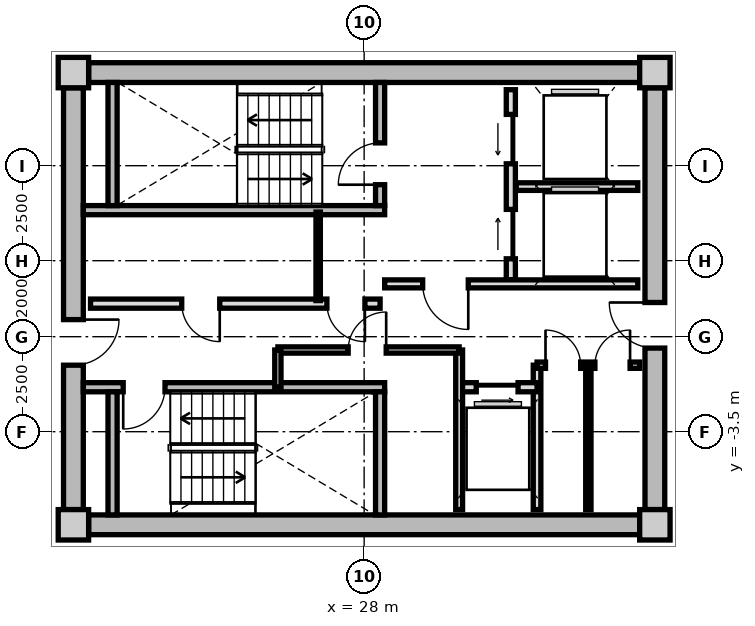
"""IFC4 building model, lengths in metres.
Left out: names, types, materials, properties, quantities, classifications, styles, units other than length and angle.
Written with IfcOpenShell. Run it as: python <this file> out.ifc"""

import sys

from ifc_helpers import new_model, si_unit, direction, frame, frame_2d, origin, origin_2d, place, context, subcontext, project, spatial, rectangle, extrude, source, transform, mapped, element, fill, save


model = new_model("IFC4")
c1 = context("Model", 3, precision=1e-05, world=origin(), true_north=direction((0.0, 1.0)))
c2 = subcontext(c1, "Body", "Model", "MODEL_VIEW")
j1 = project(units=[si_unit("LENGTHUNIT", "METRE"), si_unit("PLANEANGLEUNIT", "RADIAN")], contexts=[c1])
p1 = place(None, origin())
s1 = spatial("IfcSite", under=j1, at=p1, CompositionType="ELEMENT")
p2 = place(p1, origin())
s2 = spatial("IfcBuilding", under=s1, at=p2, CompositionType="ELEMENT")
p3 = place(p2, frame((0.0, 0.0, 238.3)))
s3 = spatial("IfcBuildingStorey", under=s2, at=p3, CompositionType="ELEMENT", Elevation=238.3)
m1 = source(origin(), c2, "Body", "SweptSolid", [
    extrude(rectangle(XDim=0.8, YDim=0.8, at=origin_2d()), origin(), (0.0, 0.0, 1.0), 3.05),
])
for number, where, z_axis, x_axis in (
    (1, (20.35, -5.95, 0.0), (0.0, 0.0, 1.0), (1.0, 0.0, 0.0)),
    (2, (35.65, -5.95, 0.0), (0.0, 0.0, 1.0), (1.0, 0.0, 0.0)),
    (3, (35.65, 5.95, 0.0), (0.0, 0.0, 1.0), (1.0, 0.0, 0.0)),
    (4, (20.35, 5.95, 0.0), (0.0, 0.0, 1.0), (1.0, 0.0, 0.0)),
):
    element("IfcColumn", number, at=place(p3, frame(where, z_axis=z_axis, x_axis=x_axis)), inside=s3, PredefinedType="COLUMN", context=c2, shape_type="MappedRepresentation", body=[
        mapped(m1, transform((0.0, 0.0, 0.0), x_axis=(1.0, 0.0, 0.0), y_axis=(0.0, 1.0, 0.0), z_axis=(0.0, 0.0, 1.0), scale=1.0)),
    ])
m2 = source(origin(), c2, "Body", "SweptSolid", [
    extrude(rectangle(XDim=14.5, YDim=0.52, at=frame_2d((7.25, 0.0))), origin(), (0.0, 0.0, 1.0), 2.81),
])
for number, where, z_axis, x_axis in (
    (5, (20.75, 5.95, 0.0), (0.0, 0.0, 1.0), (1.0, 0.0, 0.0)),
    (6, (35.25, -5.95, 0.0), (0.0, 0.0, 1.0), (-1.0, 0.0, 0.0)),
):
    element("IfcWall", number, at=place(p3, frame(where, z_axis=z_axis, x_axis=x_axis)), inside=s3, PredefinedType="SHEAR", context=c2, shape_type="MappedRepresentation", body=[
        mapped(m2, transform((0.0, 0.0, 0.0), x_axis=(1.0, 0.0, 0.0), y_axis=(0.0, 1.0, 0.0), z_axis=(0.0, 0.0, 1.0), scale=1.0)),
    ])
m3 = source(origin(), c2, "Body", "SweptSolid", [
    extrude(rectangle(XDim=11.1, YDim=0.52, at=frame_2d((5.55, 0.0))), origin(), (0.0, 0.0, 1.0), 2.81),
])
p4 = place(p3, frame((20.35, -5.55, 0.0), z_axis=(0.0, 0.0, 1.0), x_axis=(0.0, 1.0, 0.0)))
e7 = element("IfcWall", 7, at=p4, inside=s3, PredefinedType="SHEAR", context=c2, shape_type="MappedRepresentation", body=[
    mapped(m3, transform((0.0, 0.0, 0.0), x_axis=(1.0, 0.0, 0.0), y_axis=(0.0, 1.0, 0.0), z_axis=(0.0, 0.0, 1.0), scale=1.0)),
])
p5 = place(p4, frame((3.8, 0.0, 0.0)))
e8 = element("IfcOpeningElement", 8, at=p5, cuts=e7, PredefinedType="OPENING", context=c2, shape_type="SweptSolid", body=[
    extrude(rectangle(XDim=1.2, YDim=2.15, at=frame_2d((0.6, 1.075))), frame((0.0, 0.27, 0.0), z_axis=(0.0, -1.0, 0.0), x_axis=(1.0, 0.0, 0.0)), (0.0, 0.0, 1.0), 0.54),
])
p6 = place(p3, frame((35.65, 5.55, 0.0), z_axis=(0.0, 0.0, 1.0), x_axis=(0.0, -1.0, 0.0)))
e9 = element("IfcWall", 9, at=p6, inside=s3, PredefinedType="SHEAR", context=c2, shape_type="MappedRepresentation", body=[
    mapped(m3, transform((0.0, 0.0, 0.0), x_axis=(1.0, 0.0, 0.0), y_axis=(0.0, 1.0, 0.0), z_axis=(0.0, 0.0, 1.0), scale=1.0)),
])
p7 = place(p6, frame((5.65, 0.0, 0.0)))
e10 = element("IfcOpeningElement", 10, at=p7, cuts=e9, PredefinedType="OPENING", context=c2, shape_type="SweptSolid", body=[
    extrude(rectangle(XDim=1.2, YDim=2.15, at=frame_2d((0.6, 1.075))), frame((0.0, 0.27, 0.0), z_axis=(0.0, -1.0, 0.0), x_axis=(1.0, 0.0, 0.0)), (0.0, 0.0, 1.0), 0.54),
])
m4 = source(origin(), c2, "Body", "SweptSolid", [
    extrude(rectangle(XDim=7.93, YDim=0.24, at=frame_2d((3.965, 0.0))), origin(), (0.0, 0.0, 1.0), 2.81),
])
p8 = place(p3, frame((20.61, 2.33, 0.0), z_axis=(0.0, 0.0, 1.0), x_axis=(1.0, 0.0, 0.0)))
e11 = element("IfcWall", 11, at=p8, inside=s3, PredefinedType="PARTITIONING", context=c2, shape_type="MappedRepresentation", body=[
    mapped(m4, transform((0.0, 0.0, 0.0), x_axis=(1.0, 0.0, 0.0), y_axis=(0.0, 1.0, 0.0), z_axis=(0.0, 0.0, 1.0), scale=1.0)),
])
m5 = source(origin(), c2, "Body", "SweptSolid", [
    extrude(rectangle(XDim=3.24, YDim=0.24, at=frame_2d((1.62, 0.0))), origin(), (0.0, 0.0, 1.0), 2.81),
])
p9 = place(p3, frame((21.38, 2.45, 0.0), z_axis=(0.0, 0.0, 1.0), x_axis=(0.0, 1.0, 0.0)))
e12 = element("IfcWall", 12, at=p9, inside=s3, PredefinedType="PARTITIONING", context=c2, shape_type="MappedRepresentation", body=[
    mapped(m5, transform((0.0, 0.0, 0.0), x_axis=(1.0, 0.0, 0.0), y_axis=(0.0, 1.0, 0.0), z_axis=(0.0, 0.0, 1.0), scale=1.0)),
])
p10 = place(p3, frame((28.42, 2.45, 0.0), z_axis=(0.0, 0.0, 1.0), x_axis=(0.0, 1.0, 0.0)))
e13 = element("IfcWall", 13, at=p10, inside=s3, PredefinedType="PARTITIONING", context=c2, shape_type="MappedRepresentation", body=[
    mapped(m5, transform((0.0, 0.0, 0.0), x_axis=(1.0, 0.0, 0.0), y_axis=(0.0, 1.0, 0.0), z_axis=(0.0, 0.0, 1.0), scale=1.0)),
])
p11 = place(p10, frame((0.55, 0.0, 0.0)))
e14 = element("IfcOpeningElement", 14, at=p11, cuts=e13, PredefinedType="OPENING", context=c2, shape_type="SweptSolid", body=[
    extrude(rectangle(XDim=1.1, YDim=2.15, at=frame_2d((0.55, 1.075))), frame((0.0, 0.13, 0.0), z_axis=(0.0, -1.0, 0.0), x_axis=(1.0, 0.0, 0.0)), (0.0, 0.0, 1.0), 0.26),
])
p12 = place(p3, frame((20.61, -2.33, 0.0), z_axis=(0.0, 0.0, 1.0), x_axis=(1.0, 0.0, 0.0)))
e15 = element("IfcWall", 15, at=p12, inside=s3, PredefinedType="PARTITIONING", context=c2, shape_type="MappedRepresentation", body=[
    mapped(m4, transform((0.0, 0.0, 0.0), x_axis=(1.0, 0.0, 0.0), y_axis=(0.0, 1.0, 0.0), z_axis=(0.0, 0.0, 1.0), scale=1.0)),
])
p13 = place(p12, frame((1.05, 0.0, 0.0)))
e16 = element("IfcOpeningElement", 16, at=p13, cuts=e15, PredefinedType="OPENING", context=c2, shape_type="SweptSolid", body=[
    extrude(rectangle(XDim=1.1, YDim=2.15, at=frame_2d((0.55, 1.075))), frame((0.0, 0.13, 0.0), z_axis=(0.0, -1.0, 0.0), x_axis=(1.0, 0.0, 0.0)), (0.0, 0.0, 1.0), 0.26),
])
for number, where, z_axis, x_axis in (
    (17, (21.38, -5.69, 0.0), (0.0, 0.0, 1.0), (0.0, 1.0, 0.0)),
    (18, (28.42, -5.69, 0.0), (0.0, 0.0, 1.0), (0.0, 1.0, 0.0)),
):
    element("IfcWall", number, at=place(p3, frame(where, z_axis=z_axis, x_axis=x_axis)), inside=s3, PredefinedType="PARTITIONING", context=c2, shape_type="MappedRepresentation", body=[
        mapped(m5, transform((0.0, 0.0, 0.0), x_axis=(1.0, 0.0, 0.0), y_axis=(0.0, 1.0, 0.0), z_axis=(0.0, 0.0, 1.0), scale=1.0)),
    ])
m6 = source(origin(), c2, "Body", "SweptSolid", [
    extrude(rectangle(XDim=5.0, YDim=0.24, at=frame_2d((2.5, 0.0))), origin(), (0.0, 0.0, 1.0), 2.795),
])
p14 = place(p3, frame((31.86, 0.5, 0.0), z_axis=(0.0, 0.0, 1.0), x_axis=(0.0, 1.0, 0.0)))
e19 = element("IfcWall", 19, at=p14, inside=s3, PredefinedType="PARTITIONING", context=c2, shape_type="MappedRepresentation", body=[
    mapped(m6, transform((0.0, 0.0, 0.0), x_axis=(1.0, 0.0, 0.0), y_axis=(0.0, 1.0, 0.0), z_axis=(0.0, 0.0, 1.0), scale=1.0)),
])
p15 = place(p14, frame((3.05, 0.0, 0.0)))
e20 = element("IfcOpeningElement", 20, at=p15, cuts=e19, PredefinedType="OPENING", context=c2, shape_type="SweptSolid", body=[
    extrude(rectangle(XDim=1.3, YDim=2.2, at=frame_2d((0.65, 1.1))), frame((0.0, 0.13, 0.0), z_axis=(0.0, -1.0, 0.0), x_axis=(1.0, 0.0, 0.0)), (0.0, 0.0, 1.0), 0.26),
])
p16 = place(p14, frame((0.55, 0.0, 0.0)))
e21 = element("IfcOpeningElement", 21, at=p16, cuts=e19, PredefinedType="OPENING", context=c2, shape_type="SweptSolid", body=[
    extrude(rectangle(XDim=1.3, YDim=2.2, at=frame_2d((0.65, 1.1))), frame((0.0, 0.13, 0.0), z_axis=(0.0, -1.0, 0.0), x_axis=(1.0, 0.0, 0.0)), (0.0, 0.0, 1.0), 0.26),
])
m7 = source(origin(), c2, "Body", "SweptSolid", [
    extrude(rectangle(XDim=3.2, YDim=0.2, at=frame_2d((1.6, 0.0))), origin(), (0.0, 0.0, 1.0), 2.795),
])
p17 = place(p3, frame((32.0, 2.95, 0.0), z_axis=(0.0, 0.0, 1.0), x_axis=(1.0, 0.0, 0.0)))
e22 = element("IfcWall", 22, at=p17, inside=s3, PredefinedType="PARTITIONING", context=c2, shape_type="MappedRepresentation", body=[
    mapped(m7, transform((0.0, 0.0, 0.0), x_axis=(1.0, 0.0, 0.0), y_axis=(0.0, 1.0, 0.0), z_axis=(0.0, 0.0, 1.0), scale=1.0)),
])
m8 = source(origin(), c2, "Body", "SweptSolid", [
    extrude(rectangle(XDim=6.66, YDim=0.21, at=frame_2d((3.33, 0.0))), origin(), (0.0, 0.0, 1.0), 2.795),
])
p18 = place(p3, frame((28.54, 0.39, 0.0), z_axis=(0.0, 0.0, 1.0), x_axis=(1.0, 0.0, 0.0)))
e23 = element("IfcWall", 23, at=p18, inside=s3, PredefinedType="PARTITIONING", context=c2, shape_type="MappedRepresentation", body=[
    mapped(m8, transform((0.0, 0.0, 0.0), x_axis=(1.0, 0.0, 0.0), y_axis=(0.0, 1.0, 0.0), z_axis=(0.0, 0.0, 1.0), scale=1.0)),
])
p19 = place(p18, frame((1.0, 0.0, 0.0)))
e24 = element("IfcOpeningElement", 24, at=p19, cuts=e23, PredefinedType="OPENING", context=c2, shape_type="SweptSolid", body=[
    extrude(rectangle(XDim=1.2, YDim=2.15, at=frame_2d((0.6, 1.075))), frame((0.0, 0.115, 0.0), z_axis=(0.0, -1.0, 0.0), x_axis=(1.0, 0.0, 0.0)), (0.0, 0.0, 1.0), 0.23),
])
m9 = source(origin(), c2, "Body", "SweptSolid", [
    extrude(rectangle(XDim=7.62, YDim=0.24, at=frame_2d((3.81, 0.0))), origin(), (0.0, 0.0, 1.0), 2.795),
])
p20 = place(p3, frame((20.8, -0.13, 0.0), z_axis=(0.0, 0.0, 1.0), x_axis=(1.0, 0.0, 0.0)))
e25 = element("IfcWall", 25, at=p20, inside=s3, PredefinedType="PARTITIONING", context=c2, shape_type="MappedRepresentation", body=[
    mapped(m9, transform((0.0, 0.0, 0.0), x_axis=(1.0, 0.0, 0.0), y_axis=(0.0, 1.0, 0.0), z_axis=(0.0, 0.0, 1.0), scale=1.0)),
])
p21 = place(p20, frame((6.22, 0.0, 0.0)))
e26 = element("IfcOpeningElement", 26, at=p21, cuts=e25, PredefinedType="OPENING", context=c2, shape_type="SweptSolid", body=[
    extrude(rectangle(XDim=1.0, YDim=2.1, at=frame_2d((0.5, 1.05))), frame((0.0, 0.13, 0.0), z_axis=(0.0, -1.0, 0.0), x_axis=(1.0, 0.0, 0.0)), (0.0, 0.0, 1.0), 0.26),
])
p22 = place(p20, frame((2.4, 0.0, 0.0)))
e27 = element("IfcOpeningElement", 27, at=p22, cuts=e25, PredefinedType="OPENING", context=c2, shape_type="SweptSolid", body=[
    extrude(rectangle(XDim=1.0, YDim=2.1, at=frame_2d((0.5, 1.05))), frame((0.0, 0.13, 0.0), z_axis=(0.0, -1.0, 0.0), x_axis=(1.0, 0.0, 0.0)), (0.0, 0.0, 1.0), 0.26),
])
m10 = source(origin(), c2, "Body", "SweptSolid", [
    extrude(rectangle(XDim=2.33, YDim=0.115, at=frame_2d((1.165, 0.0))), origin(), (0.0, 0.0, 1.0), 2.795),
])
p23 = place(p3, frame((26.79, -0.05, 0.0), z_axis=(0.0, 0.0, 1.0), x_axis=(0.0, 1.0, 0.0)))
e28 = element("IfcWall", 28, at=p23, inside=s3, PredefinedType="PARTITIONING", context=c2, shape_type="MappedRepresentation", body=[
    mapped(m10, transform((0.0, 0.0, 0.0), x_axis=(1.0, 0.0, 0.0), y_axis=(0.0, 1.0, 0.0), z_axis=(0.0, 0.0, 1.0), scale=1.0)),
])
m11 = source(origin(), c2, "Body", "SweptSolid", [
    extrude(rectangle(XDim=3.8, YDim=0.2, at=frame_2d((1.9, 0.0))), origin(), (0.0, 0.0, 1.0), 2.795),
])
p24 = place(p3, frame((32.55, -5.55, 0.0), z_axis=(0.0, 0.0, 1.0), x_axis=(0.0, 1.0, 0.0)))
e29 = element("IfcWall", 29, at=p24, inside=s3, PredefinedType="PARTITIONING", context=c2, shape_type="MappedRepresentation", body=[
    mapped(m11, transform((0.0, 0.0, 0.0), x_axis=(1.0, 0.0, 0.0), y_axis=(0.0, 1.0, 0.0), z_axis=(0.0, 0.0, 1.0), scale=1.0)),
])
m12 = source(origin(), c2, "Body", "SweptSolid", [
    extrude(rectangle(XDim=2.05, YDim=0.24, at=frame_2d((1.025, 0.0))), origin(), (0.0, 0.0, 1.0), 2.795),
])
p25 = place(p3, frame((30.5, -2.33, 0.0), z_axis=(0.0, 0.0, 1.0), x_axis=(1.0, 0.0, 0.0)))
e30 = element("IfcWall", 30, at=p25, inside=s3, PredefinedType="PARTITIONING", context=c2, shape_type="MappedRepresentation", body=[
    mapped(m12, transform((0.0, 0.0, 0.0), x_axis=(1.0, 0.0, 0.0), y_axis=(0.0, 1.0, 0.0), z_axis=(0.0, 0.0, 1.0), scale=1.0)),
])
p26 = place(p25, frame((0.45, 0.0, 0.0)))
e31 = element("IfcOpeningElement", 31, at=p26, cuts=e30, PredefinedType="OPENING", context=c2, shape_type="SweptSolid", body=[
    extrude(rectangle(XDim=1.1, YDim=2.2, at=frame_2d((0.55, 1.1))), frame((0.0, 0.13, 0.0), z_axis=(0.0, -1.0, 0.0), x_axis=(1.0, 0.0, 0.0)), (0.0, 0.0, 1.0), 0.26),
])
m13 = source(origin(), c2, "Body", "SweptSolid", [
    extrude(rectangle(XDim=4.2, YDim=0.18, at=frame_2d((2.1, 0.0))), origin(), (0.0, 0.0, 1.0), 2.795),
])
p27 = place(p3, frame((30.5, -5.55, 0.0), z_axis=(0.0, 0.0, 1.0), x_axis=(0.0, 1.0, 0.0)))
e32 = element("IfcWall", 32, at=p27, inside=s3, PredefinedType="PARTITIONING", context=c2, shape_type="MappedRepresentation", body=[
    mapped(m13, transform((0.0, 0.0, 0.0), x_axis=(1.0, 0.0, 0.0), y_axis=(0.0, 1.0, 0.0), z_axis=(0.0, 0.0, 1.0), scale=1.0)),
])
m14 = source(origin(), c2, "Body", "SweptSolid", [
    extrude(rectangle(XDim=4.77, YDim=0.165, at=frame_2d((2.385, 0.0))), origin(), (0.0, 0.0, 1.0), 2.795),
])
p28 = place(p3, frame((25.73, -1.35, 0.0), z_axis=(0.0, 0.0, 1.0), x_axis=(1.0, 0.0, 0.0)))
e33 = element("IfcWall", 33, at=p28, inside=s3, PredefinedType="PARTITIONING", context=c2, shape_type="MappedRepresentation", body=[
    mapped(m14, transform((0.0, 0.0, 0.0), x_axis=(1.0, 0.0, 0.0), y_axis=(0.0, 1.0, 0.0), z_axis=(0.0, 0.0, 1.0), scale=1.0)),
])
p29 = place(p28, frame((1.85, 0.0, 0.0)))
e34 = element("IfcOpeningElement", 34, at=p29, cuts=e33, PredefinedType="OPENING", context=c2, shape_type="SweptSolid", body=[
    extrude(rectangle(XDim=1.0, YDim=2.1, at=frame_2d((0.5, 1.05))), frame((0.0, 0.093, 0.0), z_axis=(0.0, -1.0, 0.0), x_axis=(1.0, 0.0, 0.0)), (0.0, 0.0, 1.0), 0.185),
])
m15 = source(origin(), c2, "Body", "SweptSolid", [
    extrude(rectangle(XDim=0.98, YDim=0.165, at=frame_2d((0.49, 0.0))), origin(), (0.0, 0.0, 1.0), 2.795),
])
p30 = place(p3, frame((25.73, -2.33, 0.0), z_axis=(0.0, 0.0, 1.0), x_axis=(0.0, 1.0, 0.0)))
e35 = element("IfcWall", 35, at=p30, inside=s3, PredefinedType="PARTITIONING", context=c2, shape_type="MappedRepresentation", body=[
    mapped(m15, transform((0.0, 0.0, 0.0), x_axis=(1.0, 0.0, 0.0), y_axis=(0.0, 1.0, 0.0), z_axis=(0.0, 0.0, 1.0), scale=1.0)),
])
m16 = source(origin(), c2, "Body", "SweptSolid", [
    extrude(rectangle(XDim=2.7, YDim=0.165, at=frame_2d((1.35, 0.0))), origin(), (0.0, 0.0, 1.0), 2.795),
])
p31 = place(p3, frame((32.55, -1.75, 0.0), z_axis=(0.0, 0.0, 1.0), x_axis=(1.0, 0.0, 0.0)))
e36 = element("IfcWall", 36, at=p31, inside=s3, PredefinedType="PARTITIONING", context=c2, shape_type="MappedRepresentation", body=[
    mapped(m16, transform((0.0, 0.0, 0.0), x_axis=(1.0, 0.0, 0.0), y_axis=(0.0, 1.0, 0.0), z_axis=(0.0, 0.0, 1.0), scale=1.0)),
])
p32 = place(p31, frame((0.222, 0.0, 0.0)))
e37 = element("IfcOpeningElement", 37, at=p32, cuts=e36, PredefinedType="OPENING", context=c2, shape_type="SweptSolid", body=[
    extrude(rectangle(XDim=0.925, YDim=2.1, at=frame_2d((0.462, 1.05))), frame((0.0, 0.093, 0.0), z_axis=(0.0, -1.0, 0.0), x_axis=(1.0, 0.0, 0.0)), (0.0, 0.0, 1.0), 0.185),
])
p33 = place(p31, frame((1.522, 0.0, 0.0)))
e38 = element("IfcOpeningElement", 38, at=p33, cuts=e36, PredefinedType="OPENING", context=c2, shape_type="SweptSolid", body=[
    extrude(rectangle(XDim=0.925, YDim=2.1, at=frame_2d((0.462, 1.05))), frame((0.0, 0.093, 0.0), z_axis=(0.0, -1.0, 0.0), x_axis=(1.0, 0.0, 0.0)), (0.0, 0.0, 1.0), 0.185),
])
m17 = source(origin(), c2, "Body", "SweptSolid", [
    extrude(rectangle(XDim=3.8, YDim=0.14, at=frame_2d((1.9, 0.0))), origin(), (0.0, 0.0, 1.0), 2.795),
])
p34 = place(p3, frame((33.9, -5.55, 0.0), z_axis=(0.0, 0.0, 1.0), x_axis=(0.0, 1.0, 0.0)))
e39 = element("IfcWall", 39, at=p34, inside=s3, PredefinedType="PARTITIONING", context=c2, shape_type="MappedRepresentation", body=[
    mapped(m17, transform((0.0, 0.0, 0.0), x_axis=(1.0, 0.0, 0.0), y_axis=(0.0, 1.0, 0.0), z_axis=(0.0, 0.0, 1.0), scale=1.0)),
])
m18 = source(origin(), c2, "Body", "SweptSolid", [
    extrude(rectangle(XDim=1.1, YDim=2.15, at=frame_2d((0.55, 1.075))), frame((0.0, 0.025, 0.0), z_axis=(0.0, -1.0, 0.0), x_axis=(1.0, 0.0, 0.0)), (0.0, 0.0, 1.0), 0.05),
])
p35 = place(p11, origin())
e40 = element("IfcDoor", 40, at=p35, inside=s3, OperationType="SINGLE_SWING_LEFT", PredefinedType="DOOR", context=c2, shape_type="MappedRepresentation", body=[
    mapped(m18, transform((0.0, 0.0, 0.0), x_axis=(1.0, 0.0, 0.0), y_axis=(0.0, 1.0, 0.0), z_axis=(0.0, 0.0, 1.0), scale=1.0)),
])
fill(e14, e40)
p36 = place(p13, frame((1.1, 0.0, 0.0), z_axis=(0.0, 0.0, 1.0), x_axis=(-1.0, 0.0, 0.0)))
e41 = element("IfcDoor", 41, at=p36, inside=s3, OperationType="SINGLE_SWING_RIGHT", PredefinedType="DOOR", context=c2, shape_type="MappedRepresentation", body=[
    mapped(m18, transform((0.0, 0.0, 0.0), x_axis=(1.0, 0.0, 0.0), y_axis=(0.0, 1.0, 0.0), z_axis=(0.0, 0.0, 1.0), scale=1.0)),
])
fill(e16, e41)
m19 = source(origin(), c2, "Body", "SweptSolid", [
    extrude(rectangle(XDim=1.3, YDim=2.2, at=frame_2d((0.65, 1.1))), frame((0.0, 0.025, 0.0), z_axis=(0.0, -1.0, 0.0), x_axis=(1.0, 0.0, 0.0)), (0.0, 0.0, 1.0), 0.05),
])
p37 = place(p15, origin())
e42 = element("IfcDoor", 42, at=p37, inside=s3, OperationType="SLIDING_TO_LEFT", PredefinedType="DOOR", context=c2, shape_type="MappedRepresentation", body=[
    mapped(m19, transform((0.0, 0.0, 0.0), x_axis=(1.0, 0.0, 0.0), y_axis=(0.0, 1.0, 0.0), z_axis=(0.0, 0.0, 1.0), scale=1.0)),
])
fill(e20, e42)
p38 = place(p16, origin())
e43 = element("IfcDoor", 43, at=p38, inside=s3, OperationType="SLIDING_TO_RIGHT", PredefinedType="DOOR", context=c2, shape_type="MappedRepresentation", body=[
    mapped(m19, transform((0.0, 0.0, 0.0), x_axis=(1.0, 0.0, 0.0), y_axis=(0.0, 1.0, 0.0), z_axis=(0.0, 0.0, 1.0), scale=1.0)),
])
fill(e21, e43)
m20 = source(origin(), c2, "Body", "SweptSolid", [
    extrude(rectangle(XDim=1.2, YDim=2.15, at=frame_2d((0.6, 1.075))), frame((0.0, 0.025, 0.0), z_axis=(0.0, -1.0, 0.0), x_axis=(1.0, 0.0, 0.0)), (0.0, 0.0, 1.0), 0.05),
])
p39 = place(p19, frame((1.2, 0.0, 0.0), z_axis=(0.0, 0.0, 1.0), x_axis=(-1.0, 0.0, 0.0)))
e44 = element("IfcDoor", 44, at=p39, inside=s3, OperationType="SINGLE_SWING_LEFT", PredefinedType="DOOR", context=c2, shape_type="MappedRepresentation", body=[
    mapped(m20, transform((0.0, 0.0, 0.0), x_axis=(1.0, 0.0, 0.0), y_axis=(0.0, 1.0, 0.0), z_axis=(0.0, 0.0, 1.0), scale=1.0)),
])
fill(e24, e44)
p40 = place(p5, frame((1.2, 0.0, 0.0), z_axis=(0.0, 0.0, 1.0), x_axis=(-1.0, 0.0, 0.0)))
e45 = element("IfcDoor", 45, at=p40, inside=s3, OperationType="SINGLE_SWING_LEFT", PredefinedType="DOOR", context=c2, shape_type="MappedRepresentation", body=[
    mapped(m20, transform((0.0, 0.0, 0.0), x_axis=(1.0, 0.0, 0.0), y_axis=(0.0, 1.0, 0.0), z_axis=(0.0, 0.0, 1.0), scale=1.0)),
])
fill(e8, e45)
p41 = place(p7, frame((1.2, 0.0, 0.0), z_axis=(0.0, 0.0, 1.0), x_axis=(-1.0, 0.0, 0.0)))
e46 = element("IfcDoor", 46, at=p41, inside=s3, OperationType="SINGLE_SWING_RIGHT", PredefinedType="DOOR", context=c2, shape_type="MappedRepresentation", body=[
    mapped(m20, transform((0.0, 0.0, 0.0), x_axis=(1.0, 0.0, 0.0), y_axis=(0.0, 1.0, 0.0), z_axis=(0.0, 0.0, 1.0), scale=1.0)),
])
fill(e10, e46)
m21 = source(origin(), c2, "Body", "SweptSolid", [
    extrude(rectangle(XDim=1.0, YDim=2.1, at=frame_2d((0.5, 1.05))), frame((0.0, 0.025, 0.0), z_axis=(0.0, -1.0, 0.0), x_axis=(1.0, 0.0, 0.0)), (0.0, 0.0, 1.0), 0.05),
])
p42 = place(p21, frame((1.0, 0.0, 0.0), z_axis=(0.0, 0.0, 1.0), x_axis=(-1.0, 0.0, 0.0)))
e47 = element("IfcDoor", 47, at=p42, inside=s3, OperationType="SINGLE_SWING_LEFT", PredefinedType="DOOR", context=c2, shape_type="MappedRepresentation", body=[
    mapped(m21, transform((0.0, 0.0, 0.0), x_axis=(1.0, 0.0, 0.0), y_axis=(0.0, 1.0, 0.0), z_axis=(0.0, 0.0, 1.0), scale=1.0)),
])
fill(e26, e47)
p43 = place(p22, frame((1.0, 0.0, 0.0), z_axis=(0.0, 0.0, 1.0), x_axis=(-1.0, 0.0, 0.0)))
e48 = element("IfcDoor", 48, at=p43, inside=s3, OperationType="SINGLE_SWING_LEFT", PredefinedType="DOOR", context=c2, shape_type="MappedRepresentation", body=[
    mapped(m21, transform((0.0, 0.0, 0.0), x_axis=(1.0, 0.0, 0.0), y_axis=(0.0, 1.0, 0.0), z_axis=(0.0, 0.0, 1.0), scale=1.0)),
])
fill(e27, e48)
m22 = source(origin(), c2, "Body", "SweptSolid", [
    extrude(rectangle(XDim=1.1, YDim=2.2, at=frame_2d((0.55, 1.1))), frame((0.0, 0.025, 0.0), z_axis=(0.0, -1.0, 0.0), x_axis=(1.0, 0.0, 0.0)), (0.0, 0.0, 1.0), 0.05),
])
p44 = place(p26, frame((1.1, 0.0, 0.0), z_axis=(0.0, 0.0, 1.0), x_axis=(-1.0, 0.0, 0.0)))
e49 = element("IfcDoor", 49, at=p44, inside=s3, OperationType="SLIDING_TO_RIGHT", PredefinedType="DOOR", context=c2, shape_type="MappedRepresentation", body=[
    mapped(m22, transform((0.0, 0.0, 0.0), x_axis=(1.0, 0.0, 0.0), y_axis=(0.0, 1.0, 0.0), z_axis=(0.0, 0.0, 1.0), scale=1.0)),
])
fill(e31, e49)
p45 = place(p29, origin())
e50 = element("IfcDoor", 50, at=p45, inside=s3, OperationType="SINGLE_SWING_RIGHT", PredefinedType="DOOR", context=c2, shape_type="MappedRepresentation", body=[
    mapped(m21, transform((0.0, 0.0, 0.0), x_axis=(1.0, 0.0, 0.0), y_axis=(0.0, 1.0, 0.0), z_axis=(0.0, 0.0, 1.0), scale=1.0)),
])
fill(e34, e50)
m23 = source(origin(), c2, "Body", "SweptSolid", [
    extrude(rectangle(XDim=0.925, YDim=2.1, at=frame_2d((0.462, 1.05))), frame((0.0, 0.025, 0.0), z_axis=(0.0, -1.0, 0.0), x_axis=(1.0, 0.0, 0.0)), (0.0, 0.0, 1.0), 0.05),
])
p46 = place(p32, origin())
e51 = element("IfcDoor", 51, at=p46, inside=s3, OperationType="SINGLE_SWING_LEFT", PredefinedType="DOOR", context=c2, shape_type="MappedRepresentation", body=[
    mapped(m23, transform((0.0, 0.0, 0.0), x_axis=(1.0, 0.0, 0.0), y_axis=(0.0, 1.0, 0.0), z_axis=(0.0, 0.0, 1.0), scale=1.0)),
])
fill(e37, e51)
p47 = place(p33, origin())
e52 = element("IfcDoor", 52, at=p47, inside=s3, OperationType="SINGLE_SWING_RIGHT", PredefinedType="DOOR", context=c2, shape_type="MappedRepresentation", body=[
    mapped(m23, transform((0.0, 0.0, 0.0), x_axis=(1.0, 0.0, 0.0), y_axis=(0.0, 1.0, 0.0), z_axis=(0.0, 0.0, 1.0), scale=1.0)),
])
fill(e38, e52)
save(model, sys.argv[1])
